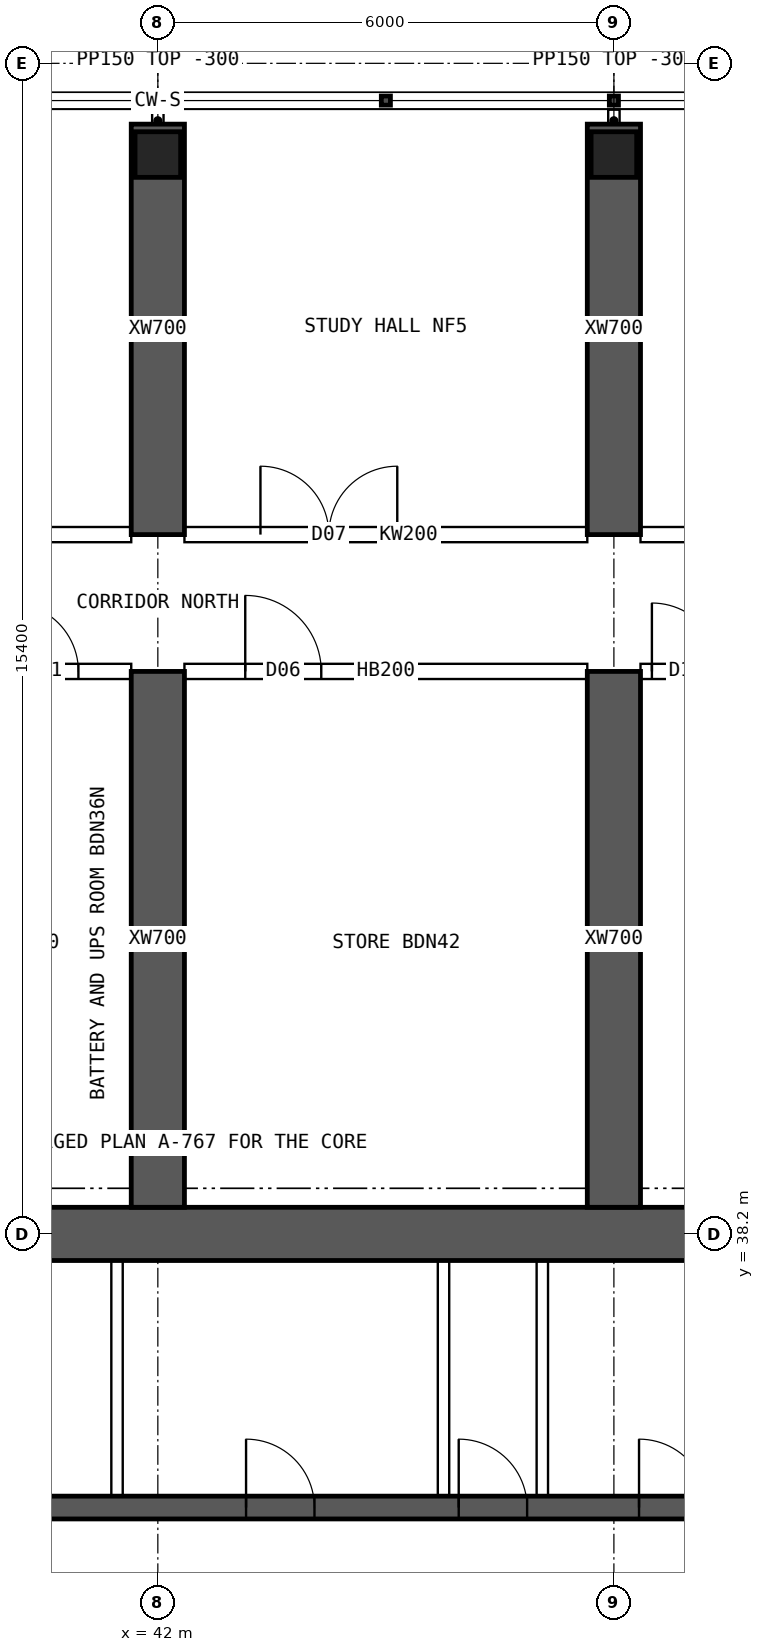
"""IFC4 building model, lengths in metres.
Left out: names, types, materials, properties, quantities, classifications, styles, units other than length and angle.
Written with IfcOpenShell. Run it as: python <this file> out.ifc"""

import sys

from ifc_helpers import new_model, si_unit, direction, frame, frame_2d, origin, origin_2d, place, context, subcontext, project, spatial, rectangle, hollow_rectangle, extrude, element, fill, save


model = new_model("IFC4")
c1 = context("Model", 3, precision=1e-05, world=origin(), true_north=direction((0.0, 1.0)))
c2 = subcontext(c1, "Body", "Model", "MODEL_VIEW")
j1 = project(units=[si_unit("LENGTHUNIT", "METRE"), si_unit("PLANEANGLEUNIT", "RADIAN")], contexts=[c1])
p1 = place(None, origin())
s1 = spatial("IfcSite", under=j1, at=p1, CompositionType="ELEMENT")
p2 = place(p1, origin())
s2 = spatial("IfcBuilding", under=s1, at=p2, CompositionType="ELEMENT")
p3 = place(p2, frame((0.0, 0.0, 257.8)))
s3 = spatial("IfcBuildingStorey", under=s2, at=p3, CompositionType="ELEMENT", Elevation=257.8)
for number, where, z_axis, x_axis in (
    (1, (42.0, 52.4, 0.0), (0.0, 0.0, 1.0), (1.0, 0.0, 0.0)),
    (2, (48.0, 52.4, 0.0), (0.0, 0.0, 1.0), (1.0, 0.0, 0.0)),
):
    element("IfcColumn", number, at=place(p3, frame(where, z_axis=z_axis, x_axis=x_axis)), inside=s3, PredefinedType="COLUMN", context=c2, shape_type="SweptSolid", body=[
        extrude(hollow_rectangle(XDim=0.6, YDim=0.6, WallThickness=0.06, at=origin_2d()), origin(), (0.0, 0.0, 1.0), 4.5),
    ])
p4 = place(p3, frame((18.0, 38.2, 0.0), z_axis=(0.0, 0.0, 1.0), x_axis=(1.0, 0.0, 0.0)))
e3 = element("IfcWall", 3, at=p4, inside=s3, PredefinedType="SHEAR", context=c2, shape_type="SweptSolid", body=[
    extrude(rectangle(XDim=48.0, YDim=0.7, at=frame_2d((24.0, 0.0))), origin(), (0.0, 0.0, 1.0), 4.5),
])
p5 = place(p3, frame((18.35, 34.6, 0.0), z_axis=(0.0, 0.0, 1.0), x_axis=(1.0, 0.0, 0.0)))
e4 = element("IfcWall", 4, at=p5, inside=s3, PredefinedType="SHEAR", context=c2, shape_type="SweptSolid", body=[
    extrude(rectangle(XDim=47.3, YDim=0.3, at=frame_2d((23.65, 0.0))), origin(), (0.0, 0.0, 1.0), 4.5),
])
p6 = place(p5, frame((0.9, 0.0, 0.0)))
e5 = element("IfcOpeningElement", 5, at=p6, cuts=e4, PredefinedType="OPENING", context=c2, shape_type="SweptSolid", body=[
    extrude(rectangle(XDim=1.1, YDim=2.1, at=frame_2d((0.55, 1.05))), frame((0.0, 0.16, 0.0), z_axis=(0.0, -1.0, 0.0), x_axis=(1.0, 0.0, 0.0)), (0.0, 0.0, 1.0), 0.32),
])
p7 = place(p5, frame((45.3, 0.0, 0.0)))
e6 = element("IfcOpeningElement", 6, at=p7, cuts=e4, PredefinedType="OPENING", context=c2, shape_type="SweptSolid", body=[
    extrude(rectangle(XDim=1.1, YDim=2.1, at=frame_2d((0.55, 1.05))), frame((0.0, 0.16, 0.0), z_axis=(0.0, -1.0, 0.0), x_axis=(1.0, 0.0, 0.0)), (0.0, 0.0, 1.0), 0.32),
])
p8 = place(p5, frame((4.25, 0.0, 0.0)))
e7 = element("IfcOpeningElement", 7, at=p8, cuts=e4, PredefinedType="OPENING", context=c2, shape_type="SweptSolid", body=[
    extrude(rectangle(XDim=0.9, YDim=2.1, at=frame_2d((0.45, 1.05))), frame((0.0, 0.16, 0.0), z_axis=(0.0, -1.0, 0.0), x_axis=(1.0, 0.0, 0.0)), (0.0, 0.0, 1.0), 0.32),
])
p9 = place(p5, frame((42.15, 0.0, 0.0)))
e8 = element("IfcOpeningElement", 8, at=p9, cuts=e4, PredefinedType="OPENING", context=c2, shape_type="SweptSolid", body=[
    extrude(rectangle(XDim=0.9, YDim=2.1, at=frame_2d((0.45, 1.05))), frame((0.0, 0.16, 0.0), z_axis=(0.0, -1.0, 0.0), x_axis=(1.0, 0.0, 0.0)), (0.0, 0.0, 1.0), 0.32),
])
p10 = place(p5, frame((9.025, 0.0, 0.0)))
e9 = element("IfcOpeningElement", 9, at=p10, cuts=e4, PredefinedType="OPENING", context=c2, shape_type="SweptSolid", body=[
    extrude(rectangle(XDim=0.9, YDim=2.1, at=frame_2d((0.45, 1.05))), frame((0.0, 0.16, 0.0), z_axis=(0.0, -1.0, 0.0), x_axis=(1.0, 0.0, 0.0)), (0.0, 0.0, 1.0), 0.32),
])
p11 = place(p5, frame((12.999, 0.0, 0.0)))
e10 = element("IfcOpeningElement", 10, at=p11, cuts=e4, PredefinedType="OPENING", context=c2, shape_type="SweptSolid", body=[
    extrude(rectangle(XDim=0.9, YDim=2.1, at=frame_2d((0.45, 1.05))), frame((0.0, 0.16, 0.0), z_axis=(0.0, -1.0, 0.0), x_axis=(1.0, 0.0, 0.0)), (0.0, 0.0, 1.0), 0.32),
])
p12 = place(p5, frame((16.646, 0.0, 0.0)))
e11 = element("IfcOpeningElement", 11, at=p12, cuts=e4, PredefinedType="OPENING", context=c2, shape_type="SweptSolid", body=[
    extrude(rectangle(XDim=0.9, YDim=2.1, at=frame_2d((0.45, 1.05))), frame((0.0, 0.16, 0.0), z_axis=(0.0, -1.0, 0.0), x_axis=(1.0, 0.0, 0.0)), (0.0, 0.0, 1.0), 0.32),
])
p13 = place(p5, frame((20.405, 0.0, 0.0)))
e12 = element("IfcOpeningElement", 12, at=p13, cuts=e4, PredefinedType="OPENING", context=c2, shape_type="SweptSolid", body=[
    extrude(rectangle(XDim=0.9, YDim=2.1, at=frame_2d((0.45, 1.05))), frame((0.0, 0.16, 0.0), z_axis=(0.0, -1.0, 0.0), x_axis=(1.0, 0.0, 0.0)), (0.0, 0.0, 1.0), 0.32),
])
p14 = place(p5, frame((24.811, 0.0, 0.0)))
e13 = element("IfcOpeningElement", 13, at=p14, cuts=e4, PredefinedType="OPENING", context=c2, shape_type="SweptSolid", body=[
    extrude(rectangle(XDim=0.9, YDim=2.1, at=frame_2d((0.45, 1.05))), frame((0.0, 0.16, 0.0), z_axis=(0.0, -1.0, 0.0), x_axis=(1.0, 0.0, 0.0)), (0.0, 0.0, 1.0), 0.32),
])
p15 = place(p5, frame((27.608, 0.0, 0.0)))
e14 = element("IfcOpeningElement", 14, at=p15, cuts=e4, PredefinedType="OPENING", context=c2, shape_type="SweptSolid", body=[
    extrude(rectangle(XDim=0.9, YDim=2.1, at=frame_2d((0.45, 1.05))), frame((0.0, 0.16, 0.0), z_axis=(0.0, -1.0, 0.0), x_axis=(1.0, 0.0, 0.0)), (0.0, 0.0, 1.0), 0.32),
])
p16 = place(p5, frame((29.981, 0.0, 0.0)))
e15 = element("IfcOpeningElement", 15, at=p16, cuts=e4, PredefinedType="OPENING", context=c2, shape_type="SweptSolid", body=[
    extrude(rectangle(XDim=0.9, YDim=2.1, at=frame_2d((0.45, 1.05))), frame((0.0, 0.16, 0.0), z_axis=(0.0, -1.0, 0.0), x_axis=(1.0, 0.0, 0.0)), (0.0, 0.0, 1.0), 0.32),
])
p17 = place(p5, frame((33.831, 0.0, 0.0)))
e16 = element("IfcOpeningElement", 16, at=p17, cuts=e4, PredefinedType="OPENING", context=c2, shape_type="SweptSolid", body=[
    extrude(rectangle(XDim=0.9, YDim=2.1, at=frame_2d((0.45, 1.05))), frame((0.0, 0.16, 0.0), z_axis=(0.0, -1.0, 0.0), x_axis=(1.0, 0.0, 0.0)), (0.0, 0.0, 1.0), 0.32),
])
p18 = place(p5, frame((37.579, 0.0, 0.0)))
e17 = element("IfcOpeningElement", 17, at=p18, cuts=e4, PredefinedType="OPENING", context=c2, shape_type="SweptSolid", body=[
    extrude(rectangle(XDim=0.9, YDim=2.1, at=frame_2d((0.45, 1.05))), frame((0.0, 0.16, 0.0), z_axis=(0.0, -1.0, 0.0), x_axis=(1.0, 0.0, 0.0)), (0.0, 0.0, 1.0), 0.32),
])
p19 = place(p3, frame((42.0, 47.4, 0.0), z_axis=(0.0, 0.0, 1.0), x_axis=(0.0, 1.0, 0.0)))
e18 = element("IfcWall", 18, at=p19, inside=s3, PredefinedType="SHEAR", context=c2, shape_type="SweptSolid", body=[
    extrude(rectangle(XDim=5.4, YDim=0.7, at=frame_2d((2.7, 0.0))), origin(), (0.0, 0.0, 1.0), 4.5),
])
p20 = place(p3, frame((42.0, 38.55, 0.0), z_axis=(0.0, 0.0, 1.0), x_axis=(0.0, 1.0, 0.0)))
e19 = element("IfcWall", 19, at=p20, inside=s3, PredefinedType="SHEAR", context=c2, shape_type="SweptSolid", body=[
    extrude(rectangle(XDim=7.05, YDim=0.7, at=frame_2d((3.525, 0.0))), origin(), (0.0, 0.0, 1.0), 4.5),
])
p21 = place(p3, frame((48.0, 47.4, 0.0), z_axis=(0.0, 0.0, 1.0), x_axis=(0.0, 1.0, 0.0)))
e20 = element("IfcWall", 20, at=p21, inside=s3, PredefinedType="SHEAR", context=c2, shape_type="SweptSolid", body=[
    extrude(rectangle(XDim=5.4, YDim=0.7, at=frame_2d((2.7, 0.0))), origin(), (0.0, 0.0, 1.0), 4.5),
])
p22 = place(p3, frame((48.0, 38.55, 0.0), z_axis=(0.0, 0.0, 1.0), x_axis=(0.0, 1.0, 0.0)))
e21 = element("IfcWall", 21, at=p22, inside=s3, PredefinedType="SHEAR", context=c2, shape_type="SweptSolid", body=[
    extrude(rectangle(XDim=7.05, YDim=0.7, at=frame_2d((3.525, 0.0))), origin(), (0.0, 0.0, 1.0), 4.5),
])
for number, where, z_axis, x_axis in (
    (22, (41.463, 34.75, 0.0), (0.0, 0.0, 1.0), (0.0, 1.0, 0.0)),
    (23, (45.758, 34.75, 0.0), (0.0, 0.0, 1.0), (0.0, 1.0, 0.0)),
    (24, (47.058, 34.75, 0.0), (0.0, 0.0, 1.0), (0.0, 1.0, 0.0)),
):
    element("IfcWall", number, at=place(p3, frame(where, z_axis=z_axis, x_axis=x_axis)), inside=s3, PredefinedType="SOLIDWALL", context=c2, shape_type="SweptSolid", body=[
        extrude(rectangle(XDim=3.1, YDim=0.15, at=frame_2d((1.55, 0.0))), origin(), (0.0, 0.0, 1.0), 4.2),
    ])
p23 = place(p3, frame((36.35, 47.4, 0.0), z_axis=(0.0, 0.0, 1.0), x_axis=(1.0, 0.0, 0.0)))
e25 = element("IfcWall", 25, at=p23, inside=s3, PredefinedType="SOLIDWALL", context=c2, shape_type="SweptSolid", body=[
    extrude(rectangle(XDim=5.3, YDim=0.2, at=frame_2d((2.65, 0.0))), origin(), (0.0, 0.0, 1.0), 4.2),
])
p24 = place(p23, frame((1.0, 0.0, 0.0)))
e26 = element("IfcOpeningElement", 26, at=p24, cuts=e25, PredefinedType="OPENING", context=c2, shape_type="SweptSolid", body=[
    extrude(rectangle(XDim=1.8, YDim=2.1, at=frame_2d((0.9, 1.05))), frame((0.0, 0.11, 0.0), z_axis=(0.0, -1.0, 0.0), x_axis=(1.0, 0.0, 0.0)), (0.0, 0.0, 1.0), 0.22),
])
p25 = place(p3, frame((36.35, 45.6, 0.0), z_axis=(0.0, 0.0, 1.0), x_axis=(1.0, 0.0, 0.0)))
e27 = element("IfcWall", 27, at=p25, inside=s3, PredefinedType="SOLIDWALL", context=c2, shape_type="SweptSolid", body=[
    extrude(rectangle(XDim=5.3, YDim=0.2, at=frame_2d((2.65, 0.0))), origin(), (0.0, 0.0, 1.0), 4.2),
])
p26 = place(p25, frame((0.15, 0.0, 0.0)))
e28 = element("IfcOpeningElement", 28, at=p26, cuts=e27, PredefinedType="OPENING", context=c2, shape_type="SweptSolid", body=[
    extrude(rectangle(XDim=0.9, YDim=2.1, at=frame_2d((0.45, 1.05))), frame((0.0, 0.11, 0.0), z_axis=(0.0, -1.0, 0.0), x_axis=(1.0, 0.0, 0.0)), (0.0, 0.0, 1.0), 0.22),
])
p27 = place(p25, frame((3.705, 0.0, 0.0)))
e29 = element("IfcOpeningElement", 29, at=p27, cuts=e27, PredefinedType="OPENING", context=c2, shape_type="SweptSolid", body=[
    extrude(rectangle(XDim=0.9, YDim=2.1, at=frame_2d((0.45, 1.05))), frame((0.0, 0.11, 0.0), z_axis=(0.0, -1.0, 0.0), x_axis=(1.0, 0.0, 0.0)), (0.0, 0.0, 1.0), 0.22),
])
p28 = place(p3, frame((42.35, 47.4, 0.0), z_axis=(0.0, 0.0, 1.0), x_axis=(1.0, 0.0, 0.0)))
e30 = element("IfcWall", 30, at=p28, inside=s3, PredefinedType="SOLIDWALL", context=c2, shape_type="SweptSolid", body=[
    extrude(rectangle(XDim=5.3, YDim=0.2, at=frame_2d((2.65, 0.0))), origin(), (0.0, 0.0, 1.0), 4.2),
])
p29 = place(p28, frame((1.0, 0.0, 0.0)))
e31 = element("IfcOpeningElement", 31, at=p29, cuts=e30, PredefinedType="OPENING", context=c2, shape_type="SweptSolid", body=[
    extrude(rectangle(XDim=1.8, YDim=2.1, at=frame_2d((0.9, 1.05))), frame((0.0, 0.11, 0.0), z_axis=(0.0, -1.0, 0.0), x_axis=(1.0, 0.0, 0.0)), (0.0, 0.0, 1.0), 0.22),
])
p30 = place(p3, frame((42.35, 45.6, 0.0), z_axis=(0.0, 0.0, 1.0), x_axis=(1.0, 0.0, 0.0)))
e32 = element("IfcWall", 32, at=p30, inside=s3, PredefinedType="SOLIDWALL", context=c2, shape_type="SweptSolid", body=[
    extrude(rectangle(XDim=5.3, YDim=0.2, at=frame_2d((2.65, 0.0))), origin(), (0.0, 0.0, 1.0), 4.2),
])
p31 = place(p30, frame((0.8, 0.0, 0.0)))
e33 = element("IfcOpeningElement", 33, at=p31, cuts=e32, PredefinedType="OPENING", context=c2, shape_type="SweptSolid", body=[
    extrude(rectangle(XDim=1.0, YDim=2.1, at=frame_2d((0.5, 1.05))), frame((0.0, 0.11, 0.0), z_axis=(0.0, -1.0, 0.0), x_axis=(1.0, 0.0, 0.0)), (0.0, 0.0, 1.0), 0.22),
])
p32 = place(p3, frame((48.35, 47.4, 0.0), z_axis=(0.0, 0.0, 1.0), x_axis=(1.0, 0.0, 0.0)))
e34 = element("IfcWall", 34, at=p32, inside=s3, PredefinedType="SOLIDWALL", context=c2, shape_type="SweptSolid", body=[
    extrude(rectangle(XDim=5.3, YDim=0.2, at=frame_2d((2.65, 0.0))), origin(), (0.0, 0.0, 1.0), 4.2),
])
p33 = place(p32, frame((1.0, 0.0, 0.0)))
e35 = element("IfcOpeningElement", 35, at=p33, cuts=e34, PredefinedType="OPENING", context=c2, shape_type="SweptSolid", body=[
    extrude(rectangle(XDim=1.8, YDim=2.1, at=frame_2d((0.9, 1.05))), frame((0.0, 0.11, 0.0), z_axis=(0.0, -1.0, 0.0), x_axis=(1.0, 0.0, 0.0)), (0.0, 0.0, 1.0), 0.22),
])
p34 = place(p3, frame((48.35, 45.6, 0.0), z_axis=(0.0, 0.0, 1.0), x_axis=(1.0, 0.0, 0.0)))
e36 = element("IfcWall", 36, at=p34, inside=s3, PredefinedType="SOLIDWALL", context=c2, shape_type="SweptSolid", body=[
    extrude(rectangle(XDim=5.3, YDim=0.2, at=frame_2d((2.65, 0.0))), origin(), (0.0, 0.0, 1.0), 4.2),
])
p35 = place(p34, frame((0.15, 0.0, 0.0)))
e37 = element("IfcOpeningElement", 37, at=p35, cuts=e36, PredefinedType="OPENING", context=c2, shape_type="SweptSolid", body=[
    extrude(rectangle(XDim=0.9, YDim=2.1, at=frame_2d((0.45, 1.05))), frame((0.0, 0.11, 0.0), z_axis=(0.0, -1.0, 0.0), x_axis=(1.0, 0.0, 0.0)), (0.0, 0.0, 1.0), 0.22),
])
p36 = place(p34, frame((2.935, 0.0, 0.0)))
e38 = element("IfcOpeningElement", 38, at=p36, cuts=e36, PredefinedType="OPENING", context=c2, shape_type="SweptSolid", body=[
    extrude(rectangle(XDim=0.9, YDim=2.1, at=frame_2d((0.45, 1.05))), frame((0.0, 0.11, 0.0), z_axis=(0.0, -1.0, 0.0), x_axis=(1.0, 0.0, 0.0)), (0.0, 0.0, 1.0), 0.22),
])
for number, where, z_axis, x_axis in (
    (39, (42.0, 52.7, 0.0), (0.0, 0.0, 1.0), (0.0, 1.0, 0.0)),
    (40, (48.0, 52.7, 0.0), (0.0, 0.0, 1.0), (0.0, 1.0, 0.0)),
):
    element("IfcWall", number, at=place(p3, frame(where, z_axis=z_axis, x_axis=x_axis)), inside=s3, PredefinedType="PARTITIONING", context=c2, shape_type="SweptSolid", body=[
        extrude(rectangle(XDim=0.29, YDim=0.15, at=frame_2d((0.145, 0.0))), origin(), (0.0, 0.0, 1.0), 4.2),
    ])
p37 = place(p14, origin())
e41 = element("IfcDoor", 41, at=p37, inside=s3, OperationType="SINGLE_SWING_LEFT", PredefinedType="DOOR", context=c2, shape_type="SweptSolid", body=[
    extrude(rectangle(XDim=0.9, YDim=2.1, at=frame_2d((0.45, 1.05))), frame((0.0, 0.025, 0.0), z_axis=(0.0, -1.0, 0.0), x_axis=(1.0, 0.0, 0.0)), (0.0, 0.0, 1.0), 0.05),
])
fill(e13, e41)
p38 = place(p15, origin())
e42 = element("IfcDoor", 42, at=p38, inside=s3, OperationType="SINGLE_SWING_LEFT", PredefinedType="DOOR", context=c2, shape_type="SweptSolid", body=[
    extrude(rectangle(XDim=0.9, YDim=2.1, at=frame_2d((0.45, 1.05))), frame((0.0, 0.025, 0.0), z_axis=(0.0, -1.0, 0.0), x_axis=(1.0, 0.0, 0.0)), (0.0, 0.0, 1.0), 0.05),
])
fill(e14, e42)
p39 = place(p16, origin())
e43 = element("IfcDoor", 43, at=p39, inside=s3, OperationType="SINGLE_SWING_LEFT", PredefinedType="DOOR", context=c2, shape_type="SweptSolid", body=[
    extrude(rectangle(XDim=0.9, YDim=2.1, at=frame_2d((0.45, 1.05))), frame((0.0, 0.025, 0.0), z_axis=(0.0, -1.0, 0.0), x_axis=(1.0, 0.0, 0.0)), (0.0, 0.0, 1.0), 0.05),
])
fill(e15, e43)
p40 = place(p29, origin())
e44 = element("IfcDoor", 44, at=p40, inside=s3, OperationType="DOUBLE_DOOR_SINGLE_SWING", PredefinedType="DOOR", context=c2, shape_type="SweptSolid", body=[
    extrude(rectangle(XDim=1.8, YDim=2.1, at=frame_2d((0.9, 1.05))), frame((0.0, 0.025, 0.0), z_axis=(0.0, -1.0, 0.0), x_axis=(1.0, 0.0, 0.0)), (0.0, 0.0, 1.0), 0.05),
])
fill(e31, e44)
p41 = place(p27, origin())
e45 = element("IfcDoor", 45, at=p41, inside=s3, OperationType="SINGLE_SWING_LEFT", PredefinedType="DOOR", context=c2, shape_type="SweptSolid", body=[
    extrude(rectangle(XDim=0.9, YDim=2.1, at=frame_2d((0.45, 1.05))), frame((0.0, 0.025, 0.0), z_axis=(0.0, -1.0, 0.0), x_axis=(1.0, 0.0, 0.0)), (0.0, 0.0, 1.0), 0.05),
])
fill(e29, e45)
p42 = place(p31, origin())
e46 = element("IfcDoor", 46, at=p42, inside=s3, OperationType="SINGLE_SWING_LEFT", PredefinedType="DOOR", context=c2, shape_type="SweptSolid", body=[
    extrude(rectangle(XDim=1.0, YDim=2.1, at=frame_2d((0.5, 1.05))), frame((0.0, 0.025, 0.0), z_axis=(0.0, -1.0, 0.0), x_axis=(1.0, 0.0, 0.0)), (0.0, 0.0, 1.0), 0.05),
])
fill(e33, e46)
p43 = place(p35, origin())
e47 = element("IfcDoor", 47, at=p43, inside=s3, OperationType="SINGLE_SWING_LEFT", PredefinedType="DOOR", context=c2, shape_type="SweptSolid", body=[
    extrude(rectangle(XDim=0.9, YDim=2.1, at=frame_2d((0.45, 1.05))), frame((0.0, 0.025, 0.0), z_axis=(0.0, -1.0, 0.0), x_axis=(1.0, 0.0, 0.0)), (0.0, 0.0, 1.0), 0.05),
])
fill(e37, e47)
save(model, sys.argv[1])
